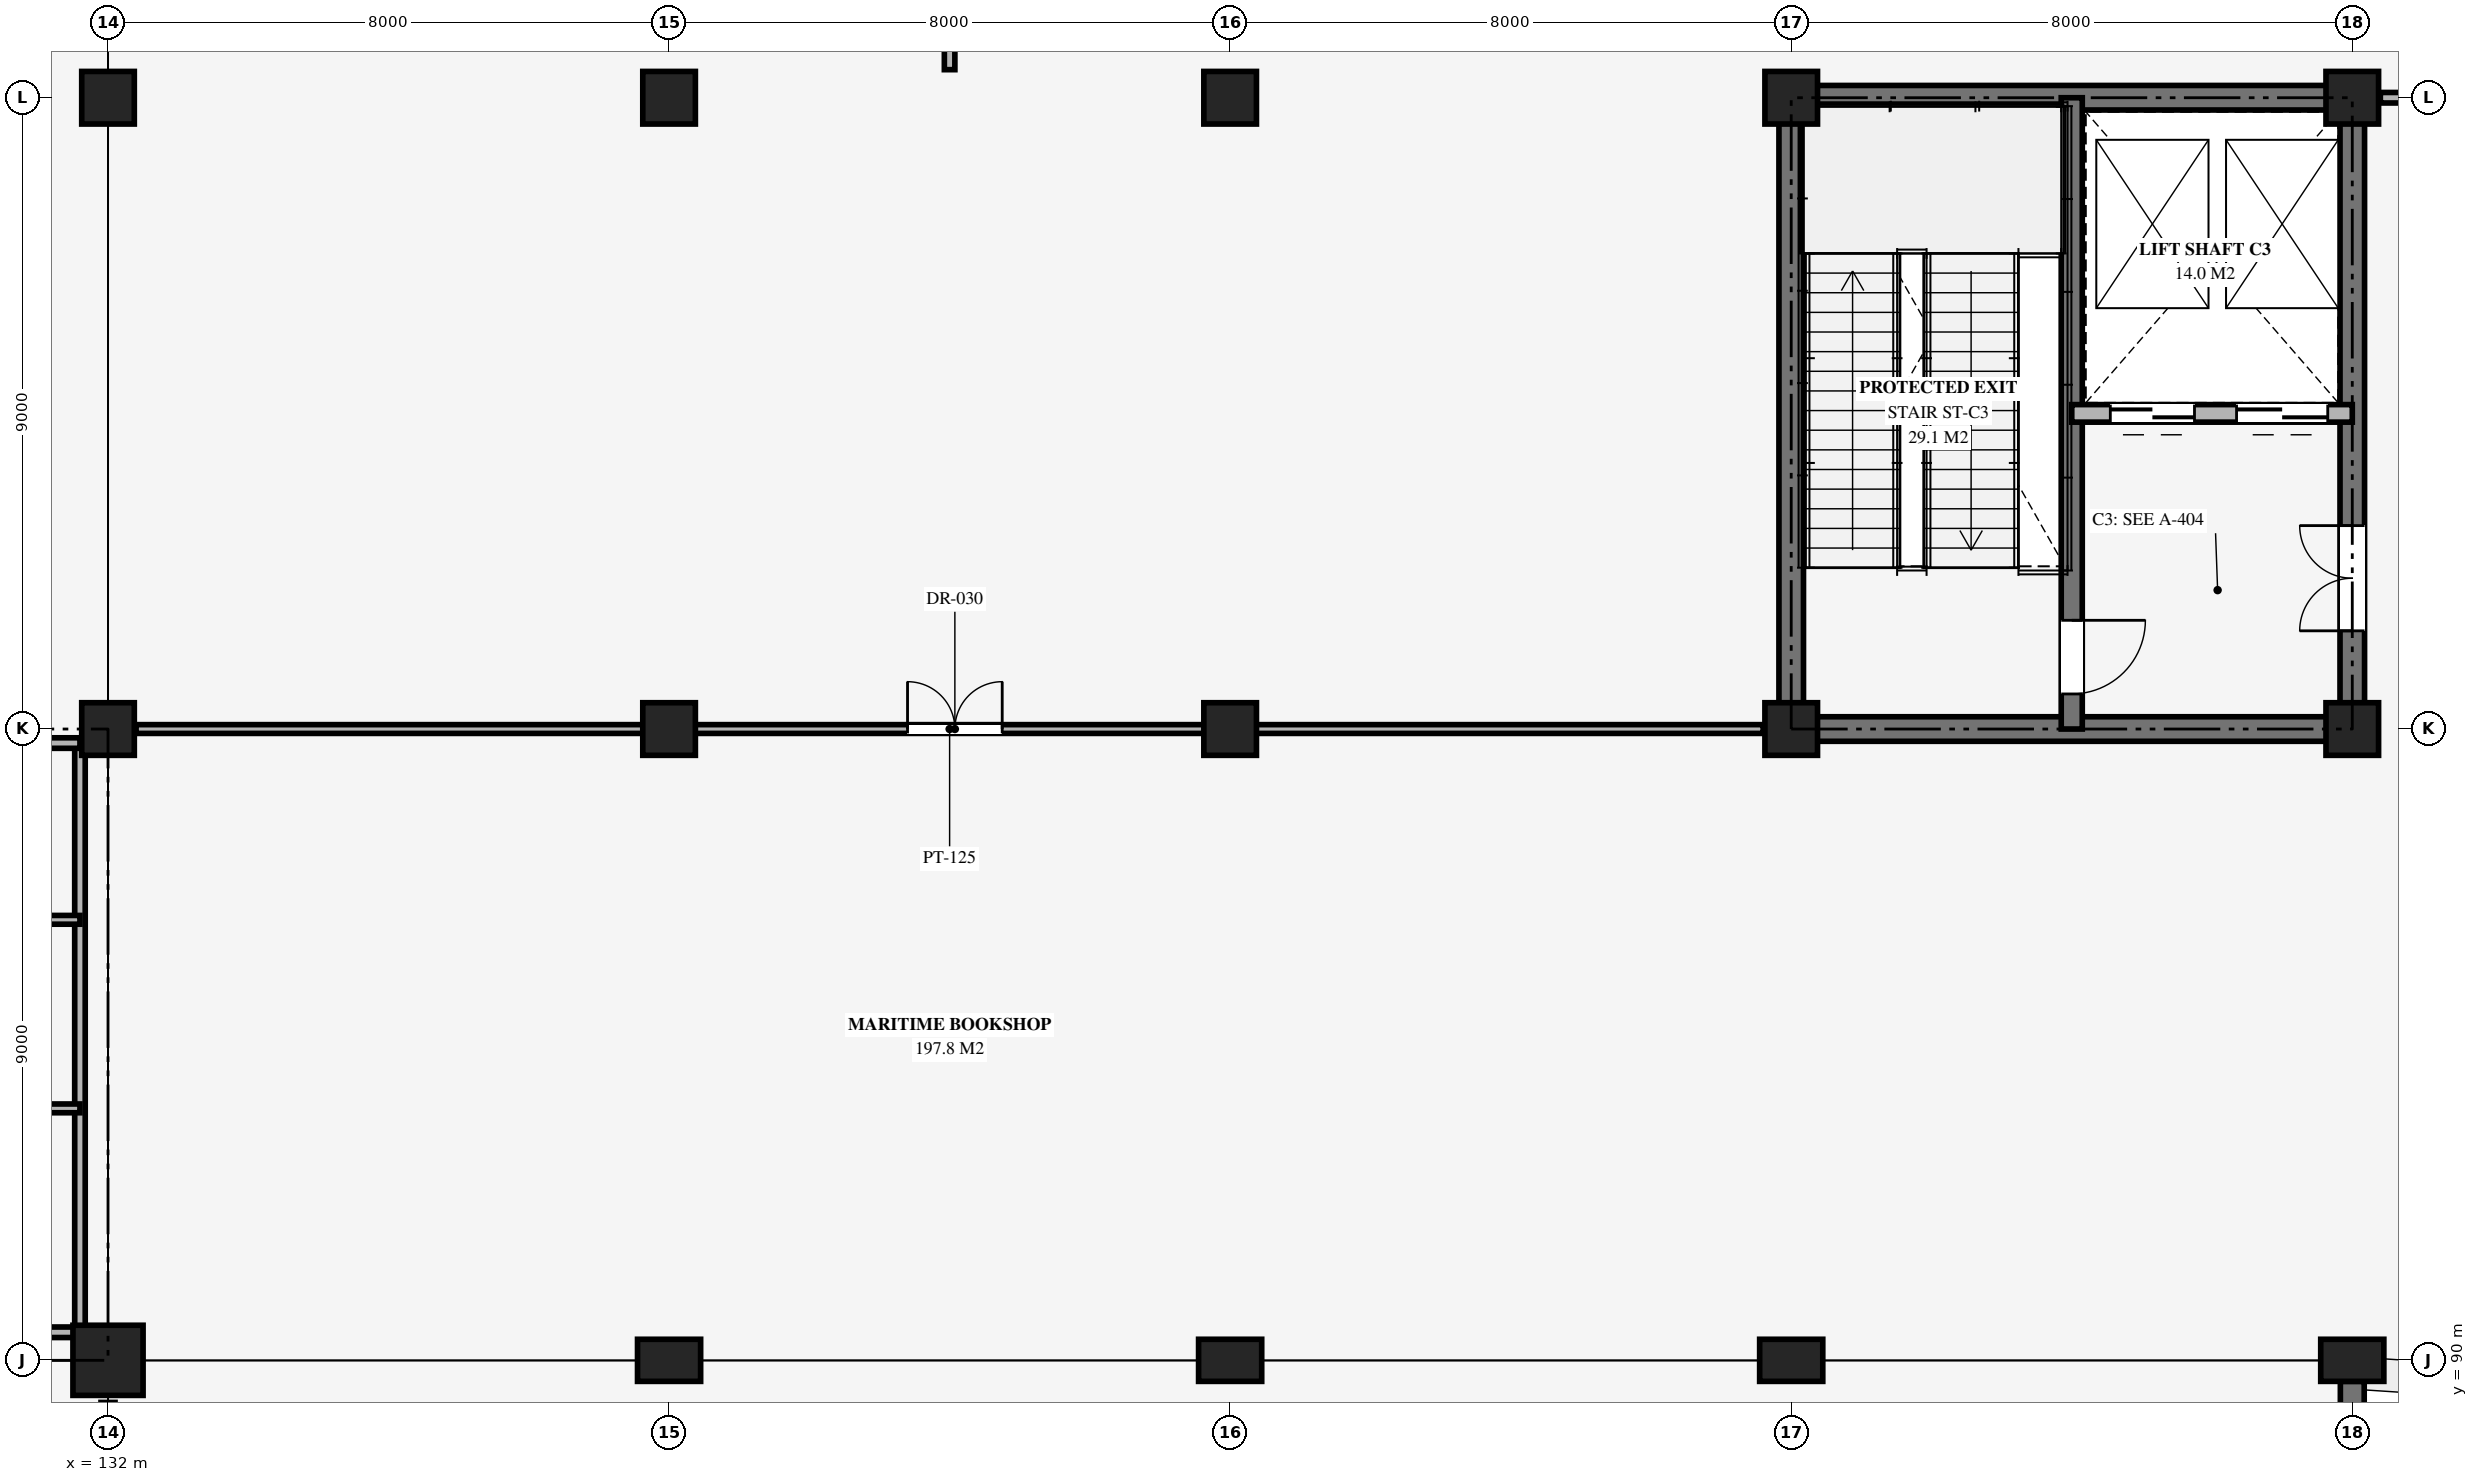
"""IFC4 building model, lengths in metres.
Left out: names, types, materials, properties, quantities, classifications, styles, units other than length and angle.
Written with IfcOpenShell. Run it as: python <this file> out.ifc"""

import sys

from ifc_helpers import new_model, si_unit, direction, frame, frame_2d, origin, origin_2d, place, context, subcontext, project, spatial, rectangle, extrude, element, fill, save


model = new_model("IFC4")
c1 = context("Model", 3, precision=1e-05, world=origin(), true_north=direction((0.0, 1.0)))
c2 = subcontext(c1, "Body", "Model", "MODEL_VIEW")
j1 = project(units=[si_unit("LENGTHUNIT", "METRE"), si_unit("PLANEANGLEUNIT", "RADIAN")], contexts=[c1])
p1 = place(None, origin())
s1 = spatial("IfcSite", under=j1, at=p1, CompositionType="ELEMENT")
p2 = place(p1, origin())
s2 = spatial("IfcBuilding", under=s1, at=p2, CompositionType="ELEMENT")
p3 = place(p2, frame((0.0, 0.0, 5.4)))
s3 = spatial("IfcBuildingStorey", under=s2, at=p3, CompositionType="ELEMENT", Elevation=5.4)
p4 = place(p3, frame((132.0, 90.0, 0.0), z_axis=(0.0, 0.0, 1.0), x_axis=(1.0, 0.0, 0.0)))
e1 = element("IfcColumn", 1, at=p4, inside=s3, PredefinedType="COLUMN", context=c2, shape_type="SweptSolid", body=[
    extrude(rectangle(XDim=1.0, YDim=1.0, at=origin_2d()), origin(), (0.0, 0.0, 1.0), 4.64),
])
for number, where, z_axis, x_axis in (
    (2, (132.0, 99.0, 0.0), (0.0, 0.0, 1.0), (1.0, 0.0, 0.0)),
    (3, (132.0, 108.0, 0.0), (0.0, 0.0, 1.0), (1.0, 0.0, 0.0)),
):
    element("IfcColumn", number, at=place(p3, frame(where, z_axis=z_axis, x_axis=x_axis)), inside=s3, PredefinedType="COLUMN", context=c2, shape_type="SweptSolid", body=[
        extrude(rectangle(XDim=0.75, YDim=0.75, at=origin_2d()), origin(), (0.0, 0.0, 1.0), 4.64),
    ])
p5 = place(p3, frame((140.0, 90.0, 0.0), z_axis=(0.0, 0.0, 1.0), x_axis=(0.0, 1.0, 0.0)))
e4 = element("IfcColumn", 4, at=p5, inside=s3, PredefinedType="PILASTER", context=c2, shape_type="SweptSolid", body=[
    extrude(rectangle(XDim=0.6, YDim=0.9, at=origin_2d()), origin(), (0.0, 0.0, 1.0), 4.64),
])
for number, where, z_axis, x_axis in (
    (5, (140.0, 99.0, 0.0), (0.0, 0.0, 1.0), (1.0, 0.0, 0.0)),
    (6, (140.0, 108.0, 0.0), (0.0, 0.0, 1.0), (1.0, 0.0, 0.0)),
):
    element("IfcColumn", number, at=place(p3, frame(where, z_axis=z_axis, x_axis=x_axis)), inside=s3, PredefinedType="COLUMN", context=c2, shape_type="SweptSolid", body=[
        extrude(rectangle(XDim=0.75, YDim=0.75, at=origin_2d()), origin(), (0.0, 0.0, 1.0), 4.64),
    ])
p6 = place(p3, frame((148.0, 90.0, 0.0), z_axis=(0.0, 0.0, 1.0), x_axis=(0.0, 1.0, 0.0)))
e7 = element("IfcColumn", 7, at=p6, inside=s3, PredefinedType="PILASTER", context=c2, shape_type="SweptSolid", body=[
    extrude(rectangle(XDim=0.6, YDim=0.9, at=origin_2d()), origin(), (0.0, 0.0, 1.0), 4.64),
])
for number, where, z_axis, x_axis in (
    (8, (148.0, 99.0, 0.0), (0.0, 0.0, 1.0), (1.0, 0.0, 0.0)),
    (9, (148.0, 108.0, 0.0), (0.0, 0.0, 1.0), (1.0, 0.0, 0.0)),
):
    element("IfcColumn", number, at=place(p3, frame(where, z_axis=z_axis, x_axis=x_axis)), inside=s3, PredefinedType="COLUMN", context=c2, shape_type="SweptSolid", body=[
        extrude(rectangle(XDim=0.75, YDim=0.75, at=origin_2d()), origin(), (0.0, 0.0, 1.0), 4.64),
    ])
p7 = place(p3, frame((156.0, 90.0, 0.0), z_axis=(0.0, 0.0, 1.0), x_axis=(0.0, 1.0, 0.0)))
e10 = element("IfcColumn", 10, at=p7, inside=s3, PredefinedType="PILASTER", context=c2, shape_type="SweptSolid", body=[
    extrude(rectangle(XDim=0.6, YDim=0.9, at=origin_2d()), origin(), (0.0, 0.0, 1.0), 4.64),
])
for number, where, z_axis, x_axis in (
    (11, (156.0, 99.0, 0.0), (0.0, 0.0, 1.0), (1.0, 0.0, 0.0)),
    (12, (156.0, 108.0, 0.0), (0.0, 0.0, 1.0), (1.0, 0.0, 0.0)),
):
    element("IfcColumn", number, at=place(p3, frame(where, z_axis=z_axis, x_axis=x_axis)), inside=s3, PredefinedType="COLUMN", context=c2, shape_type="SweptSolid", body=[
        extrude(rectangle(XDim=0.75, YDim=0.75, at=origin_2d()), origin(), (0.0, 0.0, 1.0), 4.64),
    ])
p8 = place(p3, frame((164.0, 90.0, 0.0), z_axis=(0.0, 0.0, 1.0), x_axis=(0.0, 1.0, 0.0)))
e13 = element("IfcColumn", 13, at=p8, inside=s3, PredefinedType="PILASTER", context=c2, shape_type="SweptSolid", body=[
    extrude(rectangle(XDim=0.6, YDim=0.9, at=origin_2d()), origin(), (0.0, 0.0, 1.0), 4.64),
])
for number, where, z_axis, x_axis in (
    (14, (164.0, 99.0, 0.0), (0.0, 0.0, 1.0), (1.0, 0.0, 0.0)),
    (15, (164.0, 108.0, 0.0), (0.0, 0.0, 1.0), (1.0, 0.0, 0.0)),
):
    element("IfcColumn", number, at=place(p3, frame(where, z_axis=z_axis, x_axis=x_axis)), inside=s3, PredefinedType="COLUMN", context=c2, shape_type="SweptSolid", body=[
        extrude(rectangle(XDim=0.75, YDim=0.75, at=origin_2d()), origin(), (0.0, 0.0, 1.0), 4.64),
    ])
p9 = place(p3, frame((164.0, 88.65, 0.0), z_axis=(0.0, 0.0, 1.0), x_axis=(0.0, 1.0, 0.0)))
e16 = element("IfcWall", 16, at=p9, inside=s3, PredefinedType="SOLIDWALL", context=c2, shape_type="SweptSolid", body=[
    extrude(rectangle(XDim=1.05, YDim=0.34, at=frame_2d((0.525, 0.0))), origin(), (0.0, 0.0, 1.0), 4.52),
])
for number, where, z_axis, x_axis in (
    (17, (156.0, 99.0, 0.0), (0.0, 0.0, 1.0), (1.0, 0.0, 0.0)),
    (18, (156.0, 108.0, 0.0), (0.0, 0.0, 1.0), (1.0, 0.0, 0.0)),
):
    element("IfcWall", number, at=place(p3, frame(where, z_axis=z_axis, x_axis=x_axis)), inside=s3, PredefinedType="SHEAR", context=c2, shape_type="SweptSolid", body=[
        extrude(rectangle(XDim=8.0, YDim=0.35, at=frame_2d((4.0, 0.0))), origin(), (0.0, 0.0, 1.0), 4.78),
    ])
p10 = place(p3, frame((156.0, 99.0, 0.0), z_axis=(0.0, 0.0, 1.0), x_axis=(0.0, 1.0, 0.0)))
e19 = element("IfcWall", 19, at=p10, inside=s3, PredefinedType="SHEAR", context=c2, shape_type="SweptSolid", body=[
    extrude(rectangle(XDim=9.0, YDim=0.35, at=frame_2d((4.5, 0.0))), origin(), (0.0, 0.0, 1.0), 4.78),
])
p11 = place(p3, frame((164.0, 99.0, 0.0), z_axis=(0.0, 0.0, 1.0), x_axis=(0.0, 1.0, 0.0)))
e20 = element("IfcWall", 20, at=p11, inside=s3, PredefinedType="SHEAR", context=c2, shape_type="SweptSolid", body=[
    extrude(rectangle(XDim=9.0, YDim=0.35, at=frame_2d((4.5, 0.0))), origin(), (0.0, 0.0, 1.0), 4.78),
])
p12 = place(p11, frame((1.4, 0.0, 0.0)))
e21 = element("IfcOpeningElement", 21, at=p12, cuts=e20, PredefinedType="OPENING", context=c2, shape_type="SweptSolid", body=[
    extrude(rectangle(XDim=1.5, YDim=2.2, at=frame_2d((0.75, 1.1))), frame((0.0, 0.185, 0.0), z_axis=(0.0, -1.0, 0.0), x_axis=(1.0, 0.0, 0.0)), (0.0, 0.0, 1.0), 0.37),
])
p13 = place(p3, frame((160.0, 108.0, 0.0), z_axis=(0.0, 0.0, 1.0), x_axis=(0.0, -1.0, 0.0)))
e22 = element("IfcWall", 22, at=p13, inside=s3, PredefinedType="SHEAR", context=c2, shape_type="SweptSolid", body=[
    extrude(rectangle(XDim=9.0, YDim=0.3, at=frame_2d((4.5, 0.0))), origin(), (0.0, 0.0, 1.0), 4.78),
])
p14 = place(p13, frame((7.45, 0.0, 0.0)))
e23 = element("IfcOpeningElement", 23, at=p14, cuts=e22, PredefinedType="OPENING", context=c2, shape_type="SweptSolid", body=[
    extrude(rectangle(XDim=1.05, YDim=2.15, at=frame_2d((0.525, 1.075))), frame((0.0, 0.16, 0.0), z_axis=(0.0, -1.0, 0.0), x_axis=(1.0, 0.0, 0.0)), (0.0, 0.0, 1.0), 0.32),
])
p15 = place(p3, frame((164.0, 103.5, 0.0), z_axis=(0.0, 0.0, 1.0), x_axis=(-1.0, 0.0, 0.0)))
e24 = element("IfcWall", 24, at=p15, inside=s3, PredefinedType="SOLIDWALL", context=c2, shape_type="SweptSolid", body=[
    extrude(rectangle(XDim=4.0, YDim=0.25, at=frame_2d((2.0, 0.0))), origin(), (0.0, 0.0, 1.0), 3.65),
])
p16 = place(p15, frame((0.35, 0.0, 0.0)))
e25 = element("IfcOpeningElement", 25, at=p16, cuts=e24, PredefinedType="OPENING", context=c2, shape_type="SweptSolid", body=[
    extrude(rectangle(XDim=1.3, YDim=2.25, at=frame_2d((0.65, 1.125))), frame((0.0, 0.135, 0.0), z_axis=(0.0, -1.0, 0.0), x_axis=(1.0, 0.0, 0.0)), (0.0, 0.0, 1.0), 0.27),
])
p17 = place(p15, frame((2.25, 0.0, 0.0)))
e26 = element("IfcOpeningElement", 26, at=p17, cuts=e24, PredefinedType="OPENING", context=c2, shape_type="SweptSolid", body=[
    extrude(rectangle(XDim=1.2, YDim=2.2, at=frame_2d((0.6, 1.1))), frame((0.0, 0.135, 0.0), z_axis=(0.0, -1.0, 0.0), x_axis=(1.0, 0.0, 0.0)), (0.0, 0.0, 1.0), 0.27),
])
p18 = place(p3, frame((131.6, 90.4, 0.0), z_axis=(0.0, 0.0, 1.0), x_axis=(0.0, 1.0, 0.0)))
e27 = element("IfcWall", 27, at=p18, inside=s3, PredefinedType="PARTITIONING", context=c2, shape_type="SweptSolid", body=[
    extrude(rectangle(XDim=8.4, YDim=0.15, at=frame_2d((4.2, 0.0))), origin(), (0.0, 0.0, 1.0), 3.65),
])
for number, where, z_axis, x_axis in (
    (28, (122.6, 98.8, 0.0), (0.0, 0.0, 1.0), (1.0, 0.0, 0.0)),
    (29, (122.6, 90.4, 0.0), (0.0, 0.0, 1.0), (1.0, 0.0, 0.0)),
):
    element("IfcWall", number, at=place(p3, frame(where, z_axis=z_axis, x_axis=x_axis)), inside=s3, PredefinedType="PARTITIONING", context=c2, shape_type="SweptSolid", body=[
        extrude(rectangle(XDim=9.0, YDim=0.15, at=frame_2d((4.5, 0.0))), origin(), (0.0, 0.0, 1.0), 3.65),
    ])
for number, where, z_axis, x_axis in (
    (30, (122.6, 93.592, 0.0), (0.0, 0.0, 1.0), (1.0, 0.0, 0.0)),
    (31, (122.6, 96.28, 0.0), (0.0, 0.0, 1.0), (1.0, 0.0, 0.0)),
):
    element("IfcWall", number, at=place(p3, frame(where, z_axis=z_axis, x_axis=x_axis)), inside=s3, PredefinedType="PARTITIONING", context=c2, shape_type="SweptSolid", body=[
        extrude(rectangle(XDim=9.0, YDim=0.125, at=frame_2d((4.5, 0.0))), origin(), (0.0, 0.0, 1.0), 3.65),
    ])
p19 = place(p3, frame((144.0, 108.4, 0.0), z_axis=(0.0, 0.0, 1.0), x_axis=(0.0, 1.0, 0.0)))
e32 = element("IfcWall", 32, at=p19, inside=s3, PredefinedType="PARTITIONING", context=c2, shape_type="SweptSolid", body=[
    extrude(rectangle(XDim=17.0, YDim=0.15, at=frame_2d((8.5, 0.0))), origin(), (0.0, 0.0, 1.0), 3.65),
])
p20 = place(p19, frame((6.5, 0.0, 0.0)))
e33 = element("IfcOpeningElement", 33, at=p20, cuts=e32, PredefinedType="OPENING", context=c2, shape_type="SweptSolid", body=[
    extrude(rectangle(XDim=1.4, YDim=2.15, at=frame_2d((0.7, 1.075))), frame((0.0, 0.085, 0.0), z_axis=(0.0, -1.0, 0.0), x_axis=(1.0, 0.0, 0.0)), (0.0, 0.0, 1.0), 0.17),
])
p21 = place(p3, frame((132.4, 99.0, 0.0), z_axis=(0.0, 0.0, 1.0), x_axis=(1.0, 0.0, 0.0)))
e34 = element("IfcWall", 34, at=p21, inside=s3, PredefinedType="PARTITIONING", context=c2, shape_type="SweptSolid", body=[
    extrude(rectangle(XDim=23.2, YDim=0.125, at=frame_2d((11.6, 0.0))), origin(), (0.0, 0.0, 1.0), 3.65),
])
p22 = place(p21, frame((11.0, 0.0, 0.0)))
e35 = element("IfcOpeningElement", 35, at=p22, cuts=e34, PredefinedType="OPENING", context=c2, shape_type="SweptSolid", body=[
    extrude(rectangle(XDim=1.35, YDim=2.15, at=frame_2d((0.675, 1.075))), frame((0.0, 0.073, 0.0), z_axis=(0.0, -1.0, 0.0), x_axis=(1.0, 0.0, 0.0)), (0.0, 0.0, 1.0), 0.145),
])
p23 = place(p3, frame((164.4, 108.0, 0.0), z_axis=(0.0, 0.0, 1.0), x_axis=(1.0, 0.0, 0.0)))
e36 = element("IfcWall", 36, at=p23, inside=s3, PredefinedType="PARTITIONING", context=c2, shape_type="SweptSolid", body=[
    extrude(rectangle(XDim=15.0, YDim=0.15, at=frame_2d((7.5, 0.0))), origin(), (0.0, 0.0, 1.0), 3.65),
])
p24 = place(p23, frame((4.9, 0.0, 0.0)))
e37 = element("IfcOpeningElement", 37, at=p24, cuts=e36, PredefinedType="OPENING", context=c2, shape_type="SweptSolid", body=[
    extrude(rectangle(XDim=1.0, YDim=2.15, at=frame_2d((0.5, 1.075))), frame((0.0, 0.085, 0.0), z_axis=(0.0, -1.0, 0.0), x_axis=(1.0, 0.0, 0.0)), (0.0, 0.0, 1.0), 0.17),
])
p25 = place(p16, origin())
e38 = element("IfcDoor", 38, at=p25, inside=s3, OperationType="DOUBLE_DOOR_SLIDING", PredefinedType="USERDEFINED", context=c2, shape_type="SweptSolid", body=[
    extrude(rectangle(XDim=1.3, YDim=2.25, at=frame_2d((0.65, 1.125))), frame((0.0, 0.025, 0.0), z_axis=(0.0, -1.0, 0.0), x_axis=(1.0, 0.0, 0.0)), (0.0, 0.0, 1.0), 0.05),
])
fill(e25, e38)
p26 = place(p17, origin())
e39 = element("IfcDoor", 39, at=p26, inside=s3, OperationType="DOUBLE_DOOR_SLIDING", PredefinedType="USERDEFINED", context=c2, shape_type="SweptSolid", body=[
    extrude(rectangle(XDim=1.2, YDim=2.2, at=frame_2d((0.6, 1.1))), frame((0.0, 0.025, 0.0), z_axis=(0.0, -1.0, 0.0), x_axis=(1.0, 0.0, 0.0)), (0.0, 0.0, 1.0), 0.05),
])
fill(e26, e39)
p27 = place(p14, origin())
e40 = element("IfcDoor", 40, at=p27, inside=s3, OperationType="SINGLE_SWING_LEFT", PredefinedType="DOOR", context=c2, shape_type="SweptSolid", body=[
    extrude(rectangle(XDim=1.05, YDim=2.15, at=frame_2d((0.525, 1.075))), frame((0.0, 0.025, 0.0), z_axis=(0.0, -1.0, 0.0), x_axis=(1.0, 0.0, 0.0)), (0.0, 0.0, 1.0), 0.05),
])
fill(e23, e40)
p28 = place(p12, origin())
e41 = element("IfcDoor", 41, at=p28, inside=s3, OperationType="DOUBLE_DOOR_SINGLE_SWING", PredefinedType="DOOR", context=c2, shape_type="SweptSolid", body=[
    extrude(rectangle(XDim=1.5, YDim=2.2, at=frame_2d((0.75, 1.1))), frame((0.0, 0.025, 0.0), z_axis=(0.0, -1.0, 0.0), x_axis=(1.0, 0.0, 0.0)), (0.0, 0.0, 1.0), 0.05),
])
fill(e21, e41)
p29 = place(p22, origin())
e42 = element("IfcDoor", 42, at=p29, inside=s3, OperationType="DOUBLE_DOOR_SINGLE_SWING", PredefinedType="DOOR", context=c2, shape_type="SweptSolid", body=[
    extrude(rectangle(XDim=1.35, YDim=2.15, at=frame_2d((0.675, 1.075))), frame((0.0, 0.025, 0.0), z_axis=(0.0, -1.0, 0.0), x_axis=(1.0, 0.0, 0.0)), (0.0, 0.0, 1.0), 0.05),
])
fill(e35, e42)
save(model, sys.argv[1])
